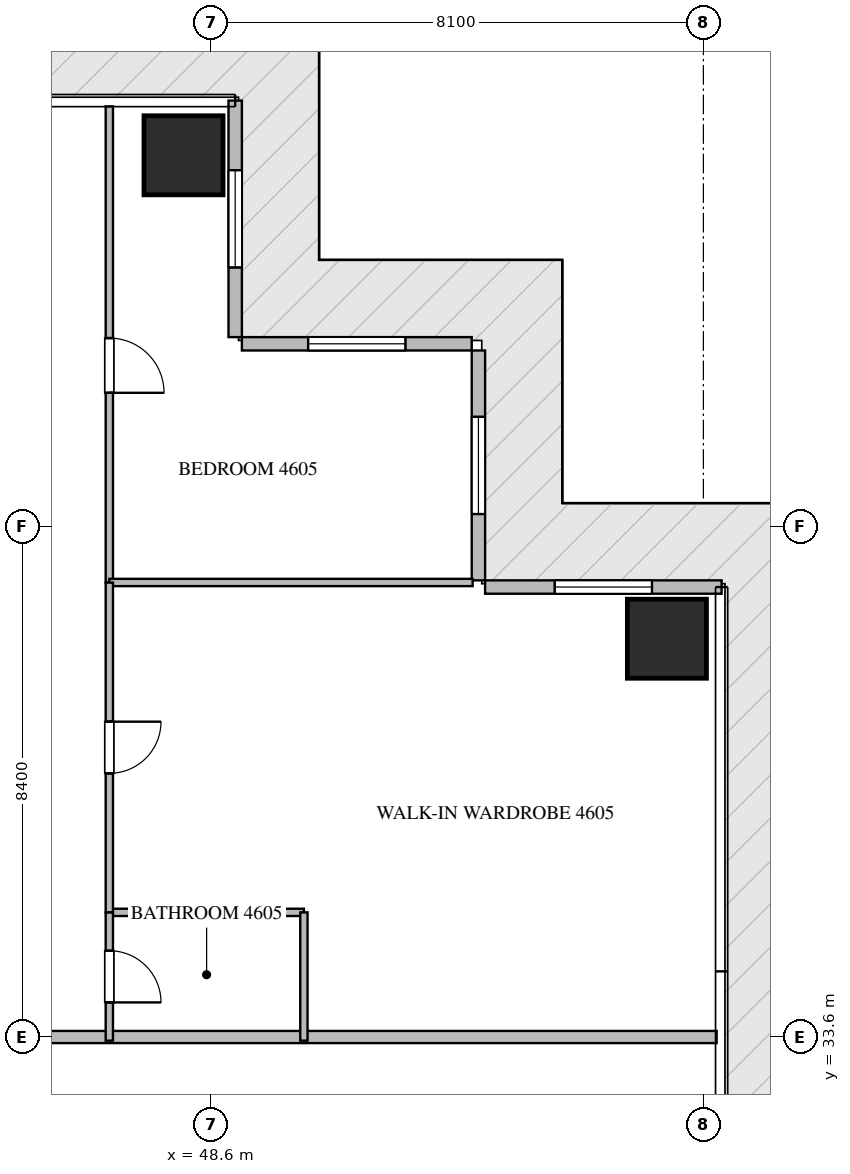
"""IFC4 building model, lengths in metres.
Left out: names, types, materials, properties, quantities, classifications, styles, units other than length and angle.
Written with IfcOpenShell. Run it as: python <this file> out.ifc"""

import sys

from ifc_helpers import new_model, si_unit, direction, frame, frame_2d, origin, origin_2d, place, context, subcontext, project, spatial, rectangle, extrude, source, transform, mapped, element, fill, save


model = new_model("IFC4")
c1 = context("Model", 3, precision=1e-05, world=origin(), true_north=direction((0.0, 1.0)))
c2 = subcontext(c1, "Body", "Model", "MODEL_VIEW")
j1 = project(units=[si_unit("LENGTHUNIT", "METRE"), si_unit("PLANEANGLEUNIT", "RADIAN")], contexts=[c1])
p1 = place(None, origin())
s1 = spatial("IfcSite", under=j1, at=p1, CompositionType="ELEMENT")
p2 = place(p1, origin())
s2 = spatial("IfcBuilding", under=s1, at=p2, CompositionType="ELEMENT")
p3 = place(p2, frame((0.0, 0.0, 183.9)))
s3 = spatial("IfcBuildingStorey", under=s2, at=p3, CompositionType="ELEMENT", Elevation=183.9)
m1 = source(origin(), c2, "Body", "SweptSolid", [
    extrude(rectangle(XDim=1.3, YDim=1.3, at=origin_2d()), origin(), (0.0, 0.0, 1.0), 3.75),
])
for number, where, z_axis, x_axis in (
    (1, (48.15, 48.1, -0.26), (0.0, 0.0, 1.0), (1.0, 0.0, 0.0)),
    (2, (56.1, 40.15, -0.26), (0.0, 0.0, 1.0), (1.0, 0.0, 0.0)),
):
    element("IfcColumn", number, at=place(p3, frame(where, z_axis=z_axis, x_axis=x_axis)), inside=s3, PredefinedType="COLUMN", context=c2, shape_type="MappedRepresentation", body=[
        mapped(m1, transform((0.0, 0.0, 0.0), scale=1.0)),
    ])
p4 = place(p3, frame((57.0, 41.0, 0.0), z_axis=(0.0, 0.0, 1.0), x_axis=(-1.0, 0.0, 0.0)))
e3 = element("IfcWall", 3, at=p4, inside=s3, PredefinedType="ELEMENTEDWALL", context=c2, shape_type="SweptSolid", body=[
    extrude(rectangle(XDim=3.89, YDim=0.22, at=frame_2d((1.945, 0.0))), origin(), (0.0, 0.0, 1.0), 3.475),
])
p5 = place(p4, frame((1.145, 0.0, 0.65)))
e4 = element("IfcOpeningElement", 4, at=p5, cuts=e3, PredefinedType="OPENING", context=c2, shape_type="SweptSolid", body=[
    extrude(rectangle(XDim=1.6, YDim=2.1, at=frame_2d((0.8, 1.05))), frame((0.0, 0.12, 0.0), z_axis=(0.0, -1.0, 0.0), x_axis=(1.0, 0.0, 0.0)), (0.0, 0.0, 1.0), 0.24),
])
p6 = place(p3, frame((53.0, 41.11, 0.0), z_axis=(0.0, 0.0, 1.0), x_axis=(0.0, 1.0, 0.0)))
e5 = element("IfcWall", 5, at=p6, inside=s3, PredefinedType="ELEMENTEDWALL", context=c2, shape_type="SweptSolid", body=[
    extrude(rectangle(XDim=3.78, YDim=0.22, at=frame_2d((1.89, 0.0))), origin(), (0.0, 0.0, 1.0), 3.475),
])
p7 = place(p6, frame((1.09, 0.0, 0.65)))
e6 = element("IfcOpeningElement", 6, at=p7, cuts=e5, PredefinedType="OPENING", context=c2, shape_type="SweptSolid", body=[
    extrude(rectangle(XDim=1.6, YDim=2.1, at=frame_2d((0.8, 1.05))), frame((0.0, 0.12, 0.0), z_axis=(0.0, -1.0, 0.0), x_axis=(1.0, 0.0, 0.0)), (0.0, 0.0, 1.0), 0.24),
])
p8 = place(p3, frame((52.89, 45.0, 0.0), z_axis=(0.0, 0.0, 1.0), x_axis=(-1.0, 0.0, 0.0)))
e7 = element("IfcWall", 7, at=p8, inside=s3, PredefinedType="ELEMENTEDWALL", context=c2, shape_type="SweptSolid", body=[
    extrude(rectangle(XDim=3.78, YDim=0.22, at=frame_2d((1.89, 0.0))), origin(), (0.0, 0.0, 1.0), 3.475),
])
p9 = place(p8, frame((1.09, 0.0, 0.65)))
e8 = element("IfcOpeningElement", 8, at=p9, cuts=e7, PredefinedType="OPENING", context=c2, shape_type="SweptSolid", body=[
    extrude(rectangle(XDim=1.6, YDim=2.1, at=frame_2d((0.8, 1.05))), frame((0.0, 0.12, 0.0), z_axis=(0.0, -1.0, 0.0), x_axis=(1.0, 0.0, 0.0)), (0.0, 0.0, 1.0), 0.24),
])
p10 = place(p3, frame((49.0, 45.11, 0.0), z_axis=(0.0, 0.0, 1.0), x_axis=(0.0, 1.0, 0.0)))
e9 = element("IfcWall", 9, at=p10, inside=s3, PredefinedType="ELEMENTEDWALL", context=c2, shape_type="SweptSolid", body=[
    extrude(rectangle(XDim=3.89, YDim=0.22, at=frame_2d((1.945, 0.0))), origin(), (0.0, 0.0, 1.0), 3.475),
])
p11 = place(p10, frame((1.145, 0.0, 0.65)))
e10 = element("IfcOpeningElement", 10, at=p11, cuts=e9, PredefinedType="OPENING", context=c2, shape_type="SweptSolid", body=[
    extrude(rectangle(XDim=1.6, YDim=2.1, at=frame_2d((0.8, 1.05))), frame((0.0, 0.12, 0.0), z_axis=(0.0, -1.0, 0.0), x_axis=(1.0, 0.0, 0.0)), (0.0, 0.0, 1.0), 0.24),
])
p12 = place(p3, frame((43.85, 33.6, 0.0), z_axis=(0.0, 0.0, 1.0), x_axis=(1.0, 0.0, 0.0)))
e11 = element("IfcWall", 11, at=p12, inside=s3, PredefinedType="PARTITIONING", context=c2, shape_type="SweptSolid", body=[
    extrude(rectangle(XDim=13.068, YDim=0.2, at=frame_2d((6.534, 0.0))), origin(), (0.0, 0.0, 1.0), 3.49),
])
p13 = place(p3, frame((46.93, 48.905, 0.0), z_axis=(0.0, 0.0, 1.0), x_axis=(0.0, -1.0, 0.0)))
e12 = element("IfcWall", 12, at=p13, inside=s3, PredefinedType="PARTITIONING", context=c2, shape_type="SweptSolid", body=[
    extrude(rectangle(XDim=7.83, YDim=0.12, at=frame_2d((3.915, 0.0))), origin(), (0.0, 0.0, 1.0), 3.49),
])
p14 = place(p13, frame((3.811, 0.0, 0.0)))
e13 = element("IfcOpeningElement", 13, at=p14, cuts=e12, PredefinedType="OPENING", context=c2, shape_type="SweptSolid", body=[
    extrude(rectangle(XDim=0.9, YDim=2.1, at=frame_2d((0.45, 1.05))), frame((0.0, 0.07, 0.0), z_axis=(0.0, -1.0, 0.0), x_axis=(1.0, 0.0, 0.0)), (0.0, 0.0, 1.0), 0.14),
])
p15 = place(p3, frame((46.93, 41.075, 0.0), z_axis=(0.0, 0.0, 1.0), x_axis=(1.0, 0.0, 0.0)))
e14 = element("IfcWall", 14, at=p15, inside=s3, PredefinedType="PARTITIONING", context=c2, shape_type="SweptSolid", body=[
    extrude(rectangle(XDim=5.975, YDim=0.12, at=frame_2d((2.988, 0.0))), origin(), (0.0, 0.0, 1.0), 3.49),
])
p16 = place(p3, frame((46.93, 35.65, 0.0), z_axis=(0.0, 0.0, 1.0), x_axis=(1.0, 0.0, 0.0)))
e15 = element("IfcWall", 15, at=p16, inside=s3, PredefinedType="PARTITIONING", context=c2, shape_type="SweptSolid", body=[
    extrude(rectangle(XDim=3.2, YDim=0.12, at=frame_2d((1.6, 0.0))), origin(), (0.0, 0.0, 1.0), 3.49),
])
p17 = place(p3, frame((50.13, 35.65, 0.0), z_axis=(0.0, 0.0, 1.0), x_axis=(0.0, -1.0, 0.0)))
e16 = element("IfcWall", 16, at=p17, inside=s3, PredefinedType="PARTITIONING", context=c2, shape_type="SweptSolid", body=[
    extrude(rectangle(XDim=2.11, YDim=0.12, at=frame_2d((1.055, 0.0))), origin(), (0.0, 0.0, 1.0), 3.49),
])
p18 = place(p3, frame((46.93, 41.073, 0.0), z_axis=(0.0, 0.0, 1.0), x_axis=(0.0, -1.0, 0.0)))
e17 = element("IfcWall", 17, at=p18, inside=s3, PredefinedType="PARTITIONING", context=c2, shape_type="SweptSolid", body=[
    extrude(rectangle(XDim=5.423, YDim=0.12, at=frame_2d((2.711, 0.0))), origin(), (0.0, 0.0, 1.0), 3.49),
])
p19 = place(p18, frame((2.287, 0.0, 0.0)))
e18 = element("IfcOpeningElement", 18, at=p19, cuts=e17, PredefinedType="OPENING", context=c2, shape_type="SweptSolid", body=[
    extrude(rectangle(XDim=0.85, YDim=2.1, at=frame_2d((0.425, 1.05))), frame((0.0, 0.07, 0.0), z_axis=(0.0, -1.0, 0.0), x_axis=(1.0, 0.0, 0.0)), (0.0, 0.0, 1.0), 0.14),
])
p20 = place(p3, frame((46.93, 35.648, 0.0), z_axis=(0.0, 0.0, 1.0), x_axis=(0.0, -1.0, 0.0)))
e19 = element("IfcWall", 19, at=p20, inside=s3, PredefinedType="PARTITIONING", context=c2, shape_type="SweptSolid", body=[
    extrude(rectangle(XDim=2.108, YDim=0.12, at=frame_2d((1.054, 0.0))), origin(), (0.0, 0.0, 1.0), 3.49),
])
p21 = place(p20, frame((0.629, 0.0, 0.0)))
e20 = element("IfcOpeningElement", 20, at=p21, cuts=e19, PredefinedType="OPENING", context=c2, shape_type="SweptSolid", body=[
    extrude(rectangle(XDim=0.85, YDim=2.1, at=frame_2d((0.425, 1.05))), frame((0.0, 0.07, 0.0), z_axis=(0.0, -1.0, 0.0), x_axis=(1.0, 0.0, 0.0)), (0.0, 0.0, 1.0), 0.14),
])
m2 = source(origin(), c2, "Body", "SweptSolid", [
    extrude(rectangle(XDim=1.6, YDim=2.1, at=frame_2d((0.8, 1.05))), frame((0.0, 0.03, 0.0), z_axis=(0.0, -1.0, 0.0), x_axis=(1.0, 0.0, 0.0)), (0.0, 0.0, 1.0), 0.06),
])
p22 = place(p5, origin())
e21 = element("IfcWindow", 21, at=p22, inside=s3, PartitioningType="SINGLE_PANEL", PredefinedType="WINDOW", context=c2, shape_type="MappedRepresentation", body=[
    mapped(m2, transform((0.0, 0.0, 0.0), scale=1.0)),
])
fill(e4, e21)
p23 = place(p7, origin())
e22 = element("IfcWindow", 22, at=p23, inside=s3, PartitioningType="SINGLE_PANEL", PredefinedType="WINDOW", context=c2, shape_type="MappedRepresentation", body=[
    mapped(m2, transform((0.0, 0.0, 0.0), scale=1.0)),
])
fill(e6, e22)
p24 = place(p9, origin())
e23 = element("IfcWindow", 23, at=p24, inside=s3, PartitioningType="SINGLE_PANEL", PredefinedType="WINDOW", context=c2, shape_type="MappedRepresentation", body=[
    mapped(m2, transform((0.0, 0.0, 0.0), scale=1.0)),
])
fill(e8, e23)
p25 = place(p11, origin())
e24 = element("IfcWindow", 24, at=p25, inside=s3, PartitioningType="SINGLE_PANEL", PredefinedType="WINDOW", context=c2, shape_type="MappedRepresentation", body=[
    mapped(m2, transform((0.0, 0.0, 0.0), scale=1.0)),
])
fill(e10, e24)
m3 = source(origin(), c2, "Body", "SweptSolid", [
    extrude(rectangle(XDim=0.9, YDim=2.1, at=frame_2d((0.45, 1.05))), frame((0.0, 0.025, 0.0), z_axis=(0.0, -1.0, 0.0), x_axis=(1.0, 0.0, 0.0)), (0.0, 0.0, 1.0), 0.05),
])
p26 = place(p14, origin())
e25 = element("IfcDoor", 25, at=p26, inside=s3, OperationType="SINGLE_SWING_RIGHT", PredefinedType="DOOR", context=c2, shape_type="MappedRepresentation", body=[
    mapped(m3, transform((0.0, 0.0, 0.0), scale=1.0)),
])
fill(e13, e25)
m4 = source(origin(), c2, "Body", "SweptSolid", [
    extrude(rectangle(XDim=0.85, YDim=2.1, at=frame_2d((0.425, 1.05))), frame((0.0, 0.025, 0.0), z_axis=(0.0, -1.0, 0.0), x_axis=(1.0, 0.0, 0.0)), (0.0, 0.0, 1.0), 0.05),
])
p27 = place(p19, origin())
e26 = element("IfcDoor", 26, at=p27, inside=s3, OperationType="SINGLE_SWING_LEFT", PredefinedType="DOOR", context=c2, shape_type="MappedRepresentation", body=[
    mapped(m4, transform((0.0, 0.0, 0.0), scale=1.0)),
])
fill(e18, e26)
p28 = place(p21, origin())
e27 = element("IfcDoor", 27, at=p28, inside=s3, OperationType="SINGLE_SWING_RIGHT", PredefinedType="DOOR", context=c2, shape_type="MappedRepresentation", body=[
    mapped(m4, transform((0.0, 0.0, 0.0), scale=1.0)),
])
fill(e20, e27)
save(model, sys.argv[1])
